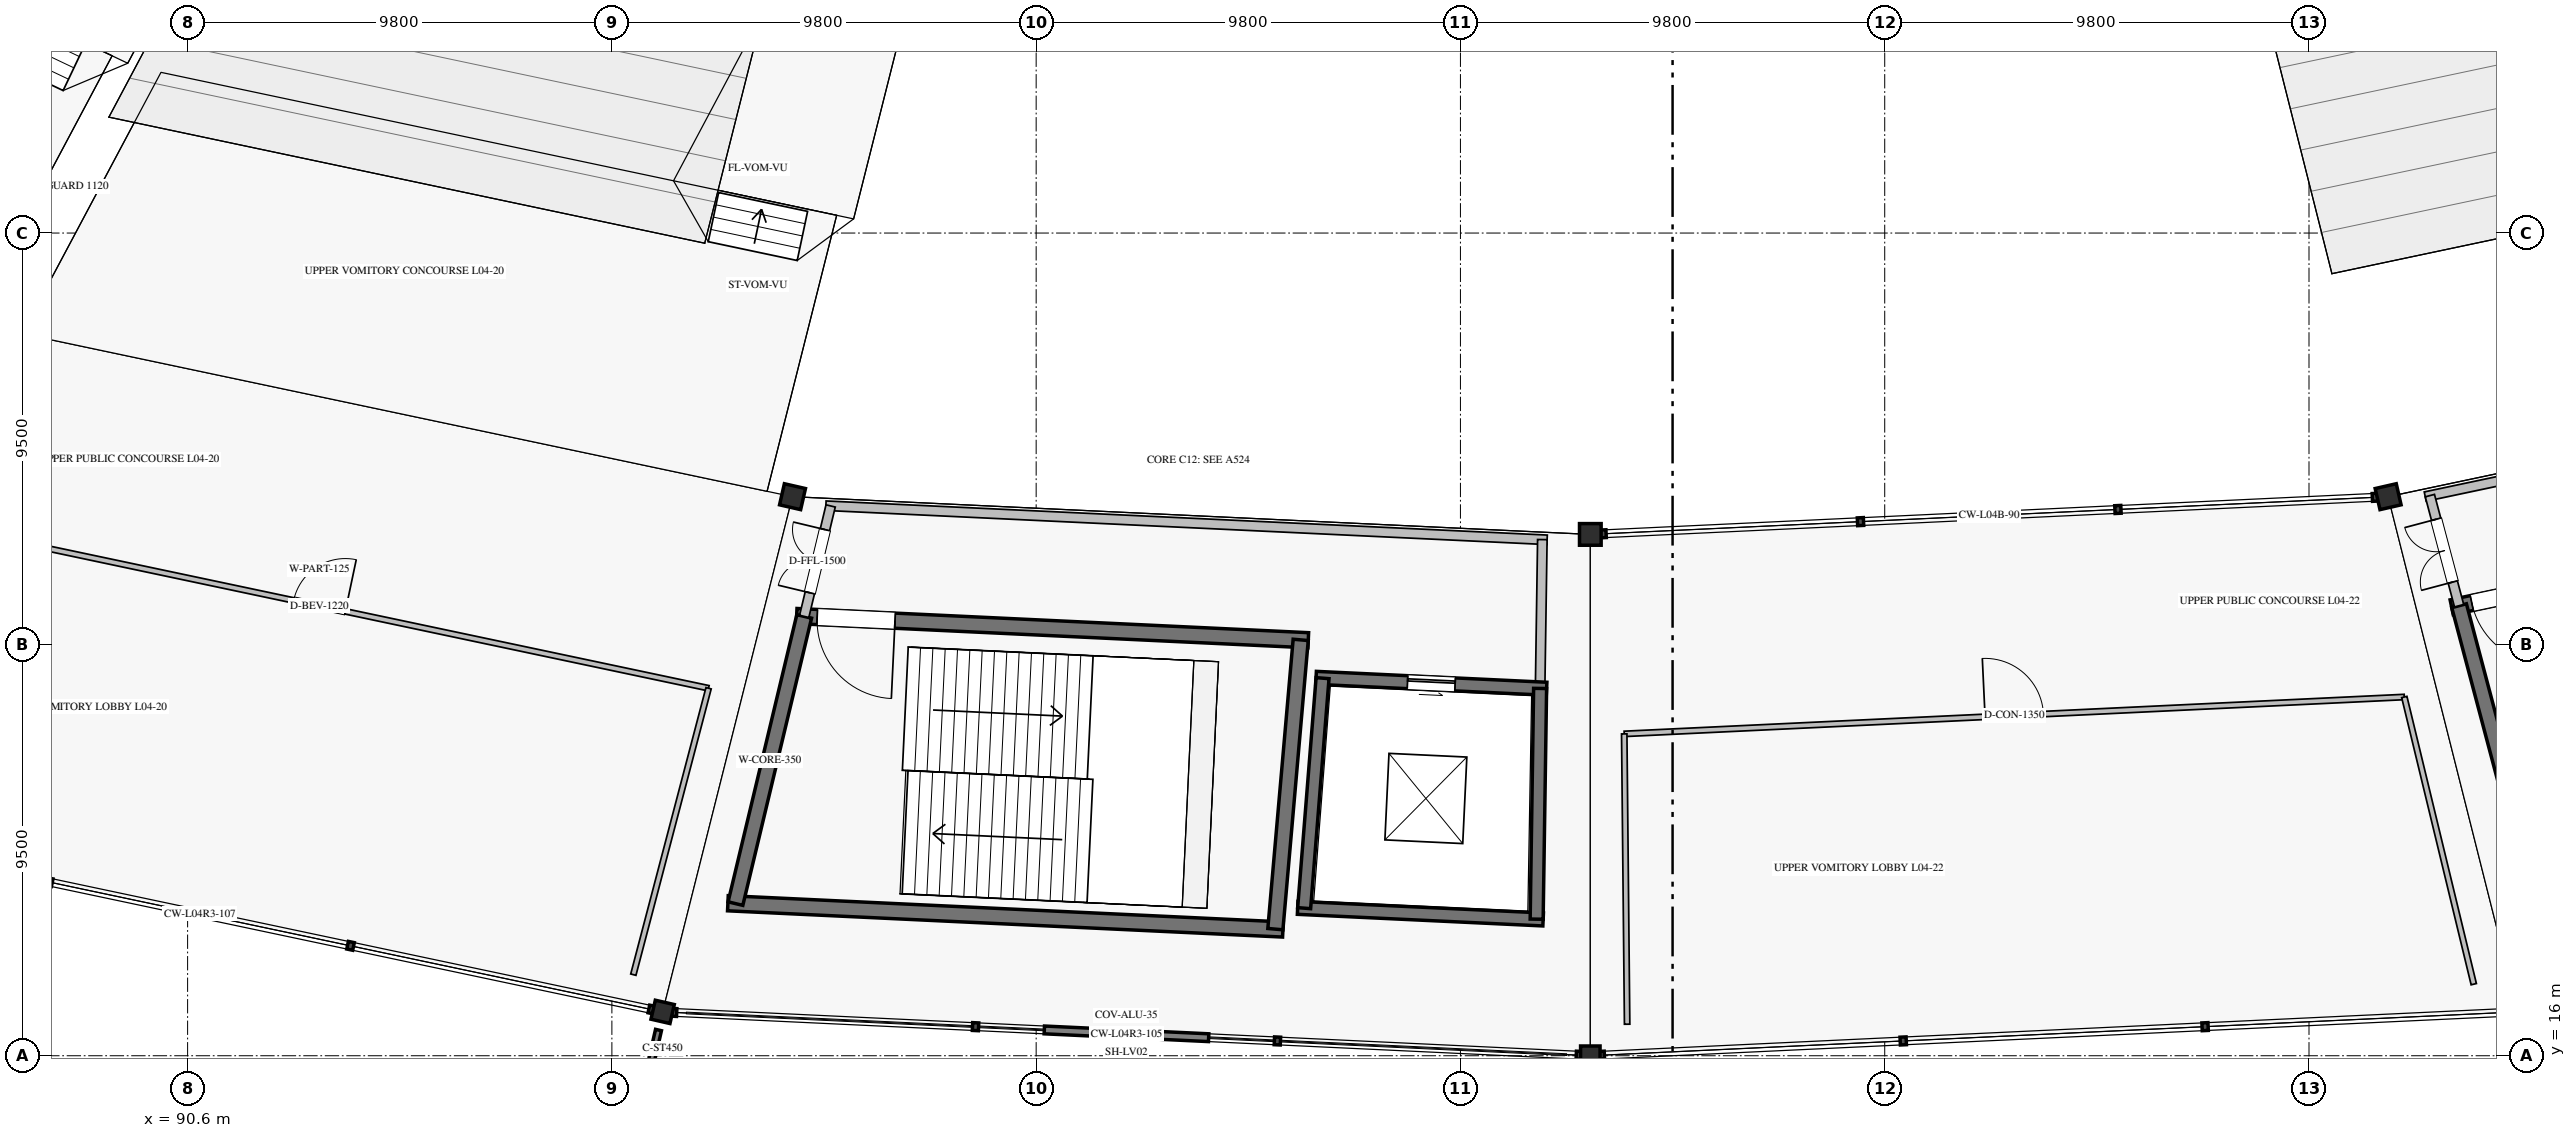
"""IFC4 building model, lengths in metres.
Left out: names, types, materials, properties, quantities, classifications, styles, units other than length and angle.
Written with IfcOpenShell. Run it as: python <this file> out.ifc"""

import sys

from ifc_helpers import new_model, si_unit, direction, frame, frame_2d, origin, origin_2d, place, context, subcontext, project, spatial, rectangle, hollow_rectangle, extrude, element, fill, save


model = new_model("IFC4")
c1 = context("Model", 3, precision=1e-05, world=origin(), true_north=direction((0.0, 1.0)))
c2 = subcontext(c1, "Body", "Model", "MODEL_VIEW")
j1 = project(units=[si_unit("LENGTHUNIT", "METRE"), si_unit("PLANEANGLEUNIT", "RADIAN")], contexts=[c1])
p1 = place(None, origin())
s1 = spatial("IfcSite", under=j1, at=p1, CompositionType="ELEMENT")
p2 = place(p1, origin())
s2 = spatial("IfcBuilding", under=s1, at=p2, CompositionType="ELEMENT")
p3 = place(p2, frame((0.0, 0.0, 20.4)))
s3 = spatial("IfcBuildingStorey", under=s2, at=p3, CompositionType="ELEMENT", Elevation=20.4)
for number, where, z_axis, x_axis in (
    (1, (104.572, 28.911, 0.0), (0.0, 0.0, 1.0), (-0.223, -0.975, 0.0)),
    (2, (123.0, 28.04, 0.0), (0.0, 0.0, 1.0), (0.0, -1.0, 0.0)),
    (3, (141.428, 28.911, 0.0), (0.0, 0.0, 1.0), (0.223, -0.975, 0.0)),
):
    element("IfcColumn", number, at=place(p3, frame(where, z_axis=z_axis, x_axis=x_axis)), inside=s3, PredefinedType="COLUMN", context=c2, shape_type="SweptSolid", body=[
        extrude(hollow_rectangle(XDim=0.5, YDim=0.5, WallThickness=0.022, at=origin_2d()), origin(), (0.0, 0.0, 1.0), 5.44),
    ])
for number, where, z_axis, x_axis in (
    (4, (101.572, 17.013, 0.0), (0.0, 0.0, 1.0), (-0.223, -0.975, 0.0)),
    (5, (123.0, 16.0, 0.0), (0.0, 0.0, 1.0), (0.0, -1.0, 0.0)),
):
    element("IfcColumn", number, at=place(p3, frame(where, z_axis=z_axis, x_axis=x_axis)), inside=s3, PredefinedType="COLUMN", context=c2, shape_type="SweptSolid", body=[
        extrude(hollow_rectangle(XDim=0.45, YDim=0.45, WallThickness=0.022, at=origin_2d()), origin(), (0.0, 0.0, 1.0), 5.44),
    ])
p4 = place(p3, frame((104.667, 26.155, 0.0), z_axis=(0.0, 0.0, 1.0), x_axis=(0.998883770468, -0.04723571843, 0.0)))
e6 = element("IfcWall", 6, at=p4, inside=s3, PredefinedType="SHEAR", context=c2, shape_type="SweptSolid", body=[
    extrude(rectangle(XDim=11.831, YDim=0.35, at=frame_2d((5.916, 0.0))), origin(), (0.0, 0.0, 1.0), 5.18),
])
p5 = place(p4, frame((0.475, 0.0, 0.0)))
e7 = element("IfcOpeningElement", 7, at=p5, cuts=e6, PredefinedType="OPENING", context=c2, shape_type="SweptSolid", body=[
    extrude(rectangle(XDim=1.8, YDim=2.2, at=frame_2d((0.9, 1.1))), frame((0.0, 0.185, 0.0), z_axis=(0.0, -1.0, 0.0), x_axis=(1.0, 0.0, 0.0)), (0.0, 0.0, 1.0), 0.37),
])
p6 = place(p3, frame((103.08, 19.522, 0.0), z_axis=(0.0, 0.0, 1.0), x_axis=(0.998884004857, -0.047230761603, 0.0)))
e8 = element("IfcWall", 8, at=p6, inside=s3, PredefinedType="SHEAR", context=c2, shape_type="SweptSolid", body=[
    extrude(rectangle(XDim=12.835, YDim=0.35, at=frame_2d((6.417, 0.0))), origin(), (0.0, 0.0, 1.0), 5.18),
])
p7 = place(p3, frame((104.842, 26.146, 0.0), z_axis=(0.0, 0.0, 1.0), x_axis=(-0.232820532896, -0.972519716747, 0.0)))
e9 = element("IfcWall", 9, at=p7, inside=s3, PredefinedType="SHEAR", context=c2, shape_type="SweptSolid", body=[
    extrude(rectangle(XDim=6.82, YDim=0.35, at=frame_2d((3.41, 0.0))), origin(), (0.0, 0.0, 1.0), 5.18),
])
p8 = place(p3, frame((116.31, 25.604, 0.0), z_axis=(0.0, 0.0, 1.0), x_axis=(-0.087232889326, -0.996187945631, 0.0)))
e10 = element("IfcWall", 10, at=p8, inside=s3, PredefinedType="SHEAR", context=c2, shape_type="SweptSolid", body=[
    extrude(rectangle(XDim=6.706, YDim=0.35, at=frame_2d((3.353, 0.0))), origin(), (0.0, 0.0, 1.0), 5.18),
])
p9 = place(p3, frame((116.665, 24.728, 0.0), z_axis=(0.0, 0.0, 1.0), x_axis=(0.998882494219, -0.047262699282, 0.0)))
e11 = element("IfcWall", 11, at=p9, inside=s3, PredefinedType="SHEAR", context=c2, shape_type="SweptSolid", body=[
    extrude(rectangle(XDim=5.331, YDim=0.3, at=frame_2d((2.666, 0.0))), origin(), (0.0, 0.0, 1.0), 5.18),
])
p10 = place(p9, frame((2.115, 0.0, 0.0)))
e12 = element("IfcOpeningElement", 12, at=p10, cuts=e11, PredefinedType="OPENING", context=c2, shape_type="SweptSolid", body=[
    extrude(rectangle(XDim=1.1, YDim=2.2, at=frame_2d((0.55, 1.1))), frame((0.0, 0.16, 0.0), z_axis=(0.0, -1.0, 0.0), x_axis=(1.0, 0.0, 0.0)), (0.0, 0.0, 1.0), 0.32),
])
p11 = place(p3, frame((116.24, 19.416, 0.0), z_axis=(0.0, 0.0, 1.0), x_axis=(0.998884329444, -0.047223896393, 0.0)))
e13 = element("IfcWall", 13, at=p11, inside=s3, PredefinedType="SHEAR", context=c2, shape_type="SweptSolid", body=[
    extrude(rectangle(XDim=5.677, YDim=0.3, at=frame_2d((2.838, 0.0))), origin(), (0.0, 0.0, 1.0), 5.18),
])
p12 = place(p3, frame((116.815, 24.72, 0.0), z_axis=(0.0, 0.0, 1.0), x_axis=(-0.079807132276, -0.996810323802, 0.0)))
e14 = element("IfcWall", 14, at=p12, inside=s3, PredefinedType="SHEAR", context=c2, shape_type="SweptSolid", body=[
    extrude(rectangle(XDim=5.329, YDim=0.3, at=frame_2d((2.665, 0.0))), origin(), (0.0, 0.0, 1.0), 5.18),
])
p13 = place(p3, frame((121.84, 24.483, 0.0), z_axis=(0.0, 0.0, 1.0), x_axis=(-0.014935332807, -0.999888461697, 0.0)))
e15 = element("IfcWall", 15, at=p13, inside=s3, PredefinedType="SHEAR", context=c2, shape_type="SweptSolid", body=[
    extrude(rectangle(XDim=5.329, YDim=0.3, at=frame_2d((2.665, 0.0))), origin(), (0.0, 0.0, 1.0), 5.18),
])
p14 = place(p3, frame((105.343, 28.703, 0.0), z_axis=(0.0, 0.0, 1.0), x_axis=(0.998884242682, -0.047225731555, 0.0)))
e16 = element("IfcWall", 16, at=p14, inside=s3, PredefinedType="SOLIDWALL", context=c2, shape_type="SweptSolid", body=[
    extrude(rectangle(XDim=16.677, YDim=0.22, at=frame_2d((8.339, 0.0))), origin(), (0.0, 0.0, 1.0), 5.18),
])
p15 = place(p3, frame((105.453, 28.698, 0.0), z_axis=(0.0, 0.0, 1.0), x_axis=(-0.232756927197, -0.972534941707, 0.0)))
e17 = element("IfcWall", 17, at=p15, inside=s3, PredefinedType="SOLIDWALL", context=c2, shape_type="SweptSolid", body=[
    extrude(rectangle(XDim=2.623, YDim=0.22, at=frame_2d((1.312, 0.0))), origin(), (0.0, 0.0, 1.0), 5.18),
])
p16 = place(p15, frame((0.562, 0.0, 0.0)))
e18 = element("IfcOpeningElement", 18, at=p16, cuts=e17, PredefinedType="OPENING", context=c2, shape_type="SweptSolid", body=[
    extrude(rectangle(XDim=1.5, YDim=2.2, at=frame_2d((0.75, 1.1))), frame((0.0, 0.12, 0.0), z_axis=(0.0, -1.0, 0.0), x_axis=(1.0, 0.0, 0.0)), (0.0, 0.0, 1.0), 0.24),
])
p17 = place(p3, frame((121.892, 27.92, 0.0), z_axis=(0.0, 0.0, 1.0), x_axis=(-0.014984113027, -0.999887731876, 0.0)))
e19 = element("IfcWall", 19, at=p17, inside=s3, PredefinedType="SOLIDWALL", context=c2, shape_type="SweptSolid", body=[
    extrude(rectangle(XDim=3.438, YDim=0.22, at=frame_2d((1.719, 0.0))), origin(), (0.0, 0.0, 1.0), 5.18),
])
p18 = place(p3, frame((142.896, 26.357, 0.0), z_axis=(0.0, 0.0, 1.0), x_axis=(0.978345203961, 0.206979858648, 0.0)))
e20 = element("IfcWall", 20, at=p18, inside=s3, PredefinedType="SHEAR", context=c2, shape_type="SweptSolid", body=[
    extrude(rectangle(XDim=12.044, YDim=0.35, at=frame_2d((6.022, 0.0))), origin(), (0.0, 0.0, 1.0), 5.18),
])
p19 = place(p18, frame((0.475, 0.0, 0.0)))
e21 = element("IfcOpeningElement", 21, at=p19, cuts=e20, PredefinedType="OPENING", context=c2, shape_type="SweptSolid", body=[
    extrude(rectangle(XDim=1.8, YDim=2.2, at=frame_2d((0.9, 1.1))), frame((0.0, 0.185, 0.0), z_axis=(0.0, -1.0, 0.0), x_axis=(1.0, 0.0, 0.0)), (0.0, 0.0, 1.0), 0.37),
])
p20 = place(p3, frame((143.067, 26.394, 0.0), z_axis=(0.0, 0.0, 1.0), x_axis=(0.256518400663, -0.966539347425, 0.0)))
e22 = element("IfcWall", 22, at=p20, inside=s3, PredefinedType="SHEAR", context=c2, shape_type="SweptSolid", body=[
    extrude(rectangle(XDim=6.84, YDim=0.35, at=frame_2d((3.42, 0.0))), origin(), (0.0, 0.0, 1.0), 5.18),
])
p21 = place(p3, frame((142.284, 28.914, 0.0), z_axis=(0.0, 0.0, 1.0), x_axis=(0.97834522483, 0.206979760008, 0.0)))
e23 = element("IfcWall", 23, at=p21, inside=s3, PredefinedType="SOLIDWALL", context=c2, shape_type="SweptSolid", body=[
    extrude(rectangle(XDim=16.983, YDim=0.22, at=frame_2d((8.491, 0.0))), origin(), (0.0, 0.0, 1.0), 5.18),
])
p22 = place(p3, frame((142.392, 28.936, 0.0), z_axis=(0.0, 0.0, 1.0), x_axis=(0.256507243456, -0.966542308466, 0.0)))
e24 = element("IfcWall", 24, at=p22, inside=s3, PredefinedType="SOLIDWALL", context=c2, shape_type="SweptSolid", body=[
    extrude(rectangle(XDim=2.631, YDim=0.22, at=frame_2d((1.315, 0.0))), origin(), (0.0, 0.0, 1.0), 5.18),
])
p23 = place(p22, frame((0.565, 0.0, 0.0)))
e25 = element("IfcOpeningElement", 25, at=p23, cuts=e24, PredefinedType="OPENING", context=c2, shape_type="SweptSolid", body=[
    extrude(rectangle(XDim=1.5, YDim=2.2, at=frame_2d((0.75, 1.1))), frame((0.0, 0.12, 0.0), z_axis=(0.0, -1.0, 0.0), x_axis=(1.0, 0.0, 0.0)), (0.0, 0.0, 1.0), 0.24),
])
p24 = place(p3, frame((84.658, 28.29, 0.0), z_axis=(0.0, 0.0, 1.0), x_axis=(0.978344735835, -0.20698207136, 0.0)))
e26 = element("IfcWall", 26, at=p24, inside=s3, PredefinedType="PARTITIONING", context=c2, shape_type="SweptSolid", body=[
    extrude(rectangle(XDim=18.374, YDim=0.125, at=frame_2d((9.187, 0.0))), origin(), (0.0, 0.0, 1.0), 4.5),
])
p25 = place(p24, frame((8.577, 0.0, 0.0)))
e27 = element("IfcOpeningElement", 27, at=p25, cuts=e26, PredefinedType="OPENING", context=c2, shape_type="SweptSolid", body=[
    extrude(rectangle(XDim=1.22, YDim=2.15, at=frame_2d((0.61, 1.075))), frame((0.0, 0.073, 0.0), z_axis=(0.0, -1.0, 0.0), x_axis=(1.0, 0.0, 0.0)), (0.0, 0.0, 1.0), 0.145),
])
p26 = place(p3, frame((102.634, 24.487, 0.0), z_axis=(0.0, 0.0, 1.0), x_axis=(-0.254126047026, -0.967171108038, 0.0)))
e28 = element("IfcWall", 28, at=p26, inside=s3, PredefinedType="PARTITIONING", context=c2, shape_type="SweptSolid", body=[
    extrude(rectangle(XDim=6.839, YDim=0.125, at=frame_2d((3.42, 0.0))), origin(), (0.0, 0.0, 1.0), 4.5),
])
p27 = place(p3, frame((123.783, 23.433, 0.0), z_axis=(0.0, 0.0, 1.0), x_axis=(0.998884400119, 0.047222401453, 0.0)))
e29 = element("IfcWall", 29, at=p27, inside=s3, PredefinedType="PARTITIONING", context=c2, shape_type="SweptSolid", body=[
    extrude(rectangle(XDim=18.038, YDim=0.125, at=frame_2d((9.019, 0.0))), origin(), (0.0, 0.0, 1.0), 4.5),
])
p28 = place(p27, frame((8.344, 0.0, 0.0)))
e30 = element("IfcOpeningElement", 30, at=p28, cuts=e29, PredefinedType="OPENING", context=c2, shape_type="SweptSolid", body=[
    extrude(rectangle(XDim=1.35, YDim=2.15, at=frame_2d((0.675, 1.075))), frame((0.0, 0.073, 0.0), z_axis=(0.0, -1.0, 0.0), x_axis=(1.0, 0.0, 0.0)), (0.0, 0.0, 1.0), 0.145),
])
p29 = place(p3, frame((123.783, 23.433, 0.0), z_axis=(0.0, 0.0, 1.0), x_axis=(0.009976563515, -0.999950232852, 0.0)))
e31 = element("IfcWall", 31, at=p29, inside=s3, PredefinedType="PARTITIONING", context=c2, shape_type="SweptSolid", body=[
    extrude(rectangle(XDim=6.705, YDim=0.125, at=frame_2d((3.353, 0.0))), origin(), (0.0, 0.0, 1.0), 4.5),
])
p30 = place(p3, frame((141.802, 24.285, 0.0), z_axis=(0.0, 0.0, 1.0), x_axis=(0.235145319277, -0.971960224918, 0.0)))
e32 = element("IfcWall", 32, at=p30, inside=s3, PredefinedType="PARTITIONING", context=c2, shape_type="SweptSolid", body=[
    extrude(rectangle(XDim=6.823, YDim=0.125, at=frame_2d((3.412, 0.0))), origin(), (0.0, 0.0, 1.0), 4.5),
])
p31 = place(p5, frame((1.8, 0.0, 0.0), z_axis=(0.0, 0.0, 1.0), x_axis=(-1.0, 0.0, 0.0)))
e33 = element("IfcDoor", 33, at=p31, inside=s3, OperationType="SINGLE_SWING_LEFT", PredefinedType="DOOR", context=c2, shape_type="SweptSolid", body=[
    extrude(rectangle(XDim=1.8, YDim=2.2, at=frame_2d((0.9, 1.1))), frame((0.0, 0.025, 0.0), z_axis=(0.0, -1.0, 0.0), x_axis=(1.0, 0.0, 0.0)), (0.0, 0.0, 1.0), 0.05),
])
fill(e7, e33)
p32 = place(p10, origin())
e34 = element("IfcDoor", 34, at=p32, inside=s3, OperationType="SLIDING_TO_RIGHT", PredefinedType="DOOR", context=c2, shape_type="SweptSolid", body=[
    extrude(rectangle(XDim=1.1, YDim=2.2, at=frame_2d((0.55, 1.1))), frame((0.0, 0.025, 0.0), z_axis=(0.0, -1.0, 0.0), x_axis=(1.0, 0.0, 0.0)), (0.0, 0.0, 1.0), 0.05),
])
fill(e12, e34)
p33 = place(p16, frame((1.5, 0.0, 0.0), z_axis=(0.0, 0.0, 1.0), x_axis=(-1.0, 0.0, 0.0)))
e35 = element("IfcDoor", 35, at=p33, inside=s3, OperationType="DOUBLE_DOOR_SINGLE_SWING", PredefinedType="DOOR", context=c2, shape_type="SweptSolid", body=[
    extrude(rectangle(XDim=1.5, YDim=2.2, at=frame_2d((0.75, 1.1))), frame((0.0, 0.025, 0.0), z_axis=(0.0, -1.0, 0.0), x_axis=(1.0, 0.0, 0.0)), (0.0, 0.0, 1.0), 0.05),
])
fill(e18, e35)
p34 = place(p19, frame((1.8, 0.0, 0.0), z_axis=(0.0, 0.0, 1.0), x_axis=(-1.0, 0.0, 0.0)))
e36 = element("IfcDoor", 36, at=p34, inside=s3, OperationType="SINGLE_SWING_LEFT", PredefinedType="DOOR", context=c2, shape_type="SweptSolid", body=[
    extrude(rectangle(XDim=1.8, YDim=2.2, at=frame_2d((0.9, 1.1))), frame((0.0, 0.025, 0.0), z_axis=(0.0, -1.0, 0.0), x_axis=(1.0, 0.0, 0.0)), (0.0, 0.0, 1.0), 0.05),
])
fill(e21, e36)
p35 = place(p23, frame((1.5, 0.0, 0.0), z_axis=(0.0, 0.0, 1.0), x_axis=(-1.0, 0.0, 0.0)))
e37 = element("IfcDoor", 37, at=p35, inside=s3, OperationType="DOUBLE_DOOR_SINGLE_SWING", PredefinedType="DOOR", context=c2, shape_type="SweptSolid", body=[
    extrude(rectangle(XDim=1.5, YDim=2.2, at=frame_2d((0.75, 1.1))), frame((0.0, 0.025, 0.0), z_axis=(0.0, -1.0, 0.0), x_axis=(1.0, 0.0, 0.0)), (0.0, 0.0, 1.0), 0.05),
])
fill(e25, e37)
p36 = place(p25, origin())
e38 = element("IfcDoor", 38, at=p36, inside=s3, OperationType="SINGLE_SWING_RIGHT", PredefinedType="DOOR", context=c2, shape_type="SweptSolid", body=[
    extrude(rectangle(XDim=1.22, YDim=2.15, at=frame_2d((0.61, 1.075))), frame((0.0, 0.025, 0.0), z_axis=(0.0, -1.0, 0.0), x_axis=(1.0, 0.0, 0.0)), (0.0, 0.0, 1.0), 0.05),
])
fill(e27, e38)
p37 = place(p28, origin())
e39 = element("IfcDoor", 39, at=p37, inside=s3, OperationType="SINGLE_SWING_LEFT", PredefinedType="DOOR", context=c2, shape_type="SweptSolid", body=[
    extrude(rectangle(XDim=1.35, YDim=2.15, at=frame_2d((0.675, 1.075))), frame((0.0, 0.025, 0.0), z_axis=(0.0, -1.0, 0.0), x_axis=(1.0, 0.0, 0.0)), (0.0, 0.0, 1.0), 0.05),
])
fill(e30, e39)
save(model, sys.argv[1])
